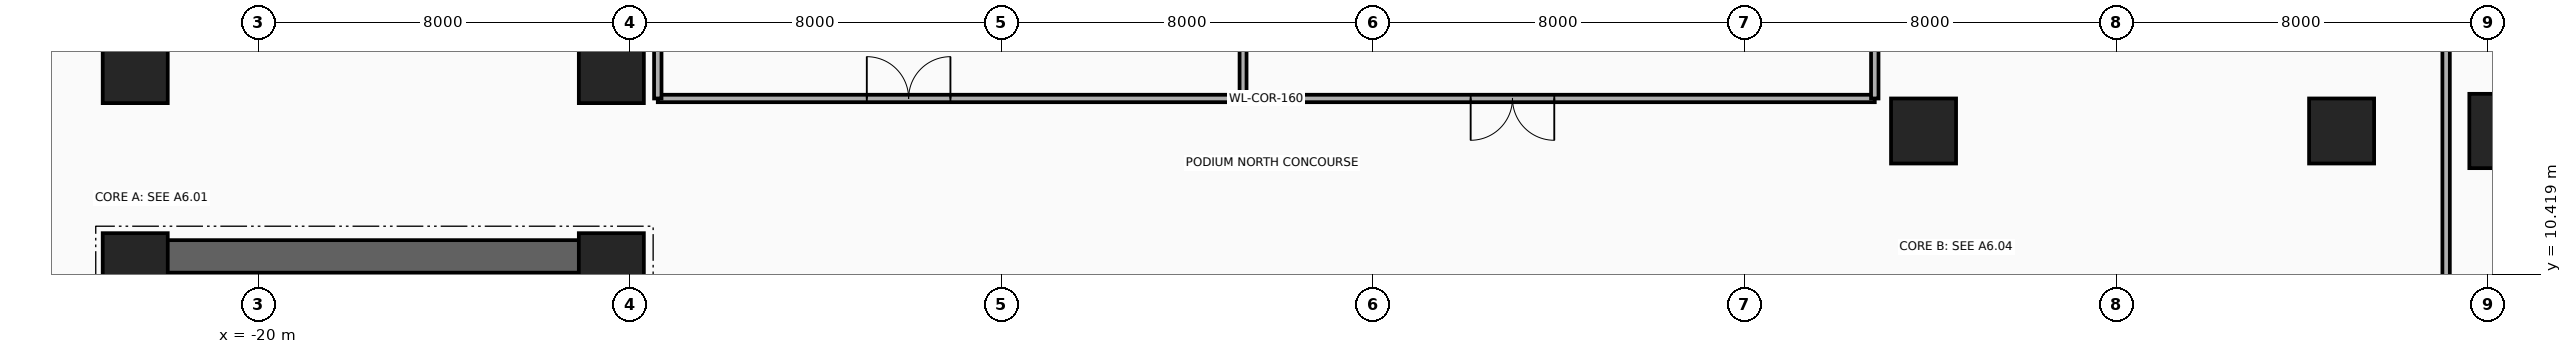
"""IFC4 building model, lengths in metres.
Left out: names, types, materials, properties, quantities, classifications, styles, units other than length and angle.
Written with IfcOpenShell. Run it as: python <this file> out.ifc"""

import sys

from ifc_helpers import new_model, si_unit, direction, frame, frame_2d, origin, origin_2d, place, context, subcontext, project, spatial, rectangle, extrude, source, transform, mapped, element, fill, save


model = new_model("IFC4")
c1 = context("Model", 3, precision=1e-05, world=origin(), true_north=direction((0.0, 1.0)))
c2 = subcontext(c1, "Body", "Model", "MODEL_VIEW")
j1 = project(units=[si_unit("LENGTHUNIT", "METRE"), si_unit("PLANEANGLEUNIT", "RADIAN")], contexts=[c1])
p1 = place(None, origin())
s1 = spatial("IfcSite", under=j1, at=p1, CompositionType="ELEMENT")
p2 = place(p1, origin())
s2 = spatial("IfcBuilding", under=s1, at=p2, CompositionType="ELEMENT")
p3 = place(p2, frame((0.0, 0.0, 10.4)))
s3 = spatial("IfcBuildingStorey", under=s2, at=p3, CompositionType="ELEMENT", Elevation=10.4)
for number, where, z_axis, x_axis in (
    (1, (-22.16, 1.78, 0.0), (0.0, 0.0, 1.0), (0.0, 1.0, 0.0)),
    (2, (-18.83, 1.78, 0.0), (0.0, 0.0, 1.0), (0.0, 1.0, 0.0)),
):
    element("IfcWall", number, at=place(p3, frame(where, z_axis=z_axis, x_axis=x_axis)), inside=s3, PredefinedType="SHEAR", context=c2, shape_type="SweptSolid", body=[
        extrude(rectangle(XDim=8.67, YDim=0.22, at=frame_2d((4.335, 0.0))), origin(), (0.0, 0.0, 1.0), 4.92),
    ])
p4 = place(p3, frame((-22.65, -11.15, 0.0), z_axis=(0.0, 0.0, 1.0), x_axis=(0.0, 1.0, 0.0)))
e3 = element("IfcWall", 3, at=p4, inside=s3, PredefinedType="SHEAR", context=c2, shape_type="SweptSolid", body=[
    extrude(rectangle(XDim=22.3, YDim=0.7, at=frame_2d((11.15, 0.0))), origin(), (0.0, 0.0, 1.0), 4.92),
])
p5 = place(p3, frame((-22.65, 10.8, 0.0), z_axis=(0.0, 0.0, 1.0), x_axis=(1.0, 0.0, 0.0)))
e4 = element("IfcWall", 4, at=p5, inside=s3, PredefinedType="SHEAR", context=c2, shape_type="SweptSolid", body=[
    extrude(rectangle(XDim=10.25, YDim=0.7, at=frame_2d((5.125, 0.0))), origin(), (0.0, 0.0, 1.0), 4.92),
])
m1 = source(origin(), c2, "Body", "SweptSolid", [
    extrude(rectangle(XDim=1.4, YDim=1.4, at=origin_2d()), origin(), (0.0, 0.0, 1.0), 5.2),
])
for number, where, z_axis, x_axis in (
    (5, (-22.65, 10.6, 0.0), (0.0, 0.0, 1.0), (1.0, 0.0, 0.0)),
    (6, (-12.4, 10.6, 0.0), (0.0, 0.0, 1.0), (1.0, 0.0, 0.0)),
    (7, (-22.65, 14.8, 0.0), (0.0, 0.0, 1.0), (1.0, 0.0, 0.0)),
    (8, (-12.4, 14.8, 0.0), (0.0, 0.0, 1.0), (1.0, 0.0, 0.0)),
    (9, (15.85, 13.5, 0.0), (0.0, 0.0, 1.0), (1.0, 0.0, 0.0)),
    (10, (24.85, 13.5, 0.0), (0.0, 0.0, 1.0), (1.0, 0.0, 0.0)),
):
    element("IfcColumn", number, at=place(p3, frame(where, z_axis=z_axis, x_axis=x_axis)), inside=s3, PredefinedType="COLUMN", context=c2, shape_type="MappedRepresentation", body=[
        mapped(m1, transform((0.0, 0.0, 0.0), x_axis=(1.0, 0.0, 0.0), y_axis=(0.0, 1.0, 0.0), z_axis=(0.0, 0.0, 1.0), scale=1.0)),
    ])
m2 = source(origin(), c2, "Body", "SweptSolid", [
    extrude(rectangle(XDim=1.6, YDim=1.6, at=origin_2d()), origin(), (0.0, 0.0, 1.0), 5.2),
])
p6 = place(p3, frame((28.4, 13.5, 0.0), z_axis=(0.0, 0.0, 1.0), x_axis=(1.0, 0.0, 0.0)))
e11 = element("IfcColumn", 11, at=p6, inside=s3, PredefinedType="COLUMN", context=c2, shape_type="MappedRepresentation", body=[
    mapped(m2, transform((0.0, 0.0, 0.0), x_axis=(1.0, 0.0, 0.0), y_axis=(0.0, 1.0, 0.0), z_axis=(0.0, 0.0, 1.0), scale=1.0)),
])
p7 = place(p3, frame((-11.4, 14.2, 0.0), z_axis=(0.0, 0.0, 1.0), x_axis=(1.0, 0.0, 0.0)))
e12 = element("IfcWall", 12, at=p7, inside=s3, PredefinedType="PARTITIONING", context=c2, shape_type="SweptSolid", body=[
    extrude(rectangle(XDim=26.2, YDim=0.16, at=frame_2d((13.1, 0.0))), origin(), (0.0, 0.0, 1.0), 4.92),
])
p8 = place(p7, frame((4.5, 0.0, 0.0)))
e13 = element("IfcOpeningElement", 13, at=p8, cuts=e12, PredefinedType="OPENING", context=c2, shape_type="SweptSolid", body=[
    extrude(rectangle(XDim=1.8, YDim=2.15, at=frame_2d((0.9, 1.075))), frame((0.0, 0.095, 0.0), z_axis=(0.0, -1.0, 0.0), x_axis=(1.0, 0.0, 0.0)), (0.0, 0.0, 1.0), 0.19),
])
p9 = place(p7, frame((17.5, 0.0, 0.0)))
e14 = element("IfcOpeningElement", 14, at=p9, cuts=e12, PredefinedType="OPENING", context=c2, shape_type="SweptSolid", body=[
    extrude(rectangle(XDim=1.8, YDim=2.15, at=frame_2d((0.9, 1.075))), frame((0.0, 0.095, 0.0), z_axis=(0.0, -1.0, 0.0), x_axis=(1.0, 0.0, 0.0)), (0.0, 0.0, 1.0), 0.19),
])
for number, where, z_axis, x_axis in (
    (15, (-11.4, 14.2, 0.0), (0.0, 0.0, 1.0), (0.0, 1.0, 0.0)),
    (16, (14.8, 14.2, 0.0), (0.0, 0.0, 1.0), (0.0, 1.0, 0.0)),
):
    element("IfcWall", number, at=place(p3, frame(where, z_axis=z_axis, x_axis=x_axis)), inside=s3, PredefinedType="PARTITIONING", context=c2, shape_type="SweptSolid", body=[
        extrude(rectangle(XDim=8.54, YDim=0.16, at=frame_2d((4.27, 0.0))), origin(), (0.0, 0.0, 1.0), 3.957),
    ])
p10 = place(p3, frame((1.2, 14.2, 0.0), z_axis=(0.0, 0.0, 1.0), x_axis=(0.0, 1.0, 0.0)))
e17 = element("IfcWall", 17, at=p10, inside=s3, PredefinedType="PARTITIONING", context=c2, shape_type="SweptSolid", body=[
    extrude(rectangle(XDim=8.54, YDim=0.15, at=frame_2d((4.27, 0.0))), origin(), (0.0, 0.0, 1.0), 3.957),
])
p11 = place(p3, frame((27.1, -22.74, 0.0), z_axis=(0.0, 0.0, 1.0), x_axis=(0.0, 1.0, 0.0)))
e18 = element("IfcWall", 18, at=p11, inside=s3, PredefinedType="PARTITIONING", context=c2, shape_type="SweptSolid", body=[
    extrude(rectangle(XDim=45.48, YDim=0.16, at=frame_2d((22.74, 0.0))), origin(), (0.0, 0.0, 1.0), 3.957),
])
p12 = place(p11, frame((7.0, 0.0, 0.0)))
e19 = element("IfcOpeningElement", 19, at=p12, cuts=e18, PredefinedType="OPENING", context=c2, shape_type="SweptSolid", body=[
    extrude(rectangle(XDim=1.8, YDim=2.15, at=frame_2d((0.9, 1.075))), frame((0.0, 0.095, 0.0), z_axis=(0.0, -1.0, 0.0), x_axis=(1.0, 0.0, 0.0)), (0.0, 0.0, 1.0), 0.19),
])
p13 = place(p11, frame((25.0, 0.0, 0.0)))
e20 = element("IfcOpeningElement", 20, at=p13, cuts=e18, PredefinedType="OPENING", context=c2, shape_type="SweptSolid", body=[
    extrude(rectangle(XDim=1.8, YDim=2.15, at=frame_2d((0.9, 1.075))), frame((0.0, 0.095, 0.0), z_axis=(0.0, -1.0, 0.0), x_axis=(1.0, 0.0, 0.0)), (0.0, 0.0, 1.0), 0.19),
])
p14 = place(p8, origin())
e21 = element("IfcDoor", 21, at=p14, inside=s3, OperationType="DOUBLE_DOOR_SINGLE_SWING", PredefinedType="DOOR", context=c2, shape_type="SweptSolid", body=[
    extrude(rectangle(XDim=1.8, YDim=2.15, at=frame_2d((0.9, 1.075))), frame((0.0, 0.025, 0.0), z_axis=(0.0, -1.0, 0.0), x_axis=(1.0, 0.0, 0.0)), (0.0, 0.0, 1.0), 0.05),
])
fill(e13, e21)
p15 = place(p9, frame((1.8, 0.0, 0.0), z_axis=(0.0, 0.0, 1.0), x_axis=(-1.0, 0.0, 0.0)))
e22 = element("IfcDoor", 22, at=p15, inside=s3, OperationType="DOUBLE_DOOR_SINGLE_SWING", PredefinedType="DOOR", context=c2, shape_type="SweptSolid", body=[
    extrude(rectangle(XDim=1.8, YDim=2.15, at=frame_2d((0.9, 1.075))), frame((0.0, 0.025, 0.0), z_axis=(0.0, -1.0, 0.0), x_axis=(1.0, 0.0, 0.0)), (0.0, 0.0, 1.0), 0.05),
])
fill(e14, e22)
save(model, sys.argv[1])
